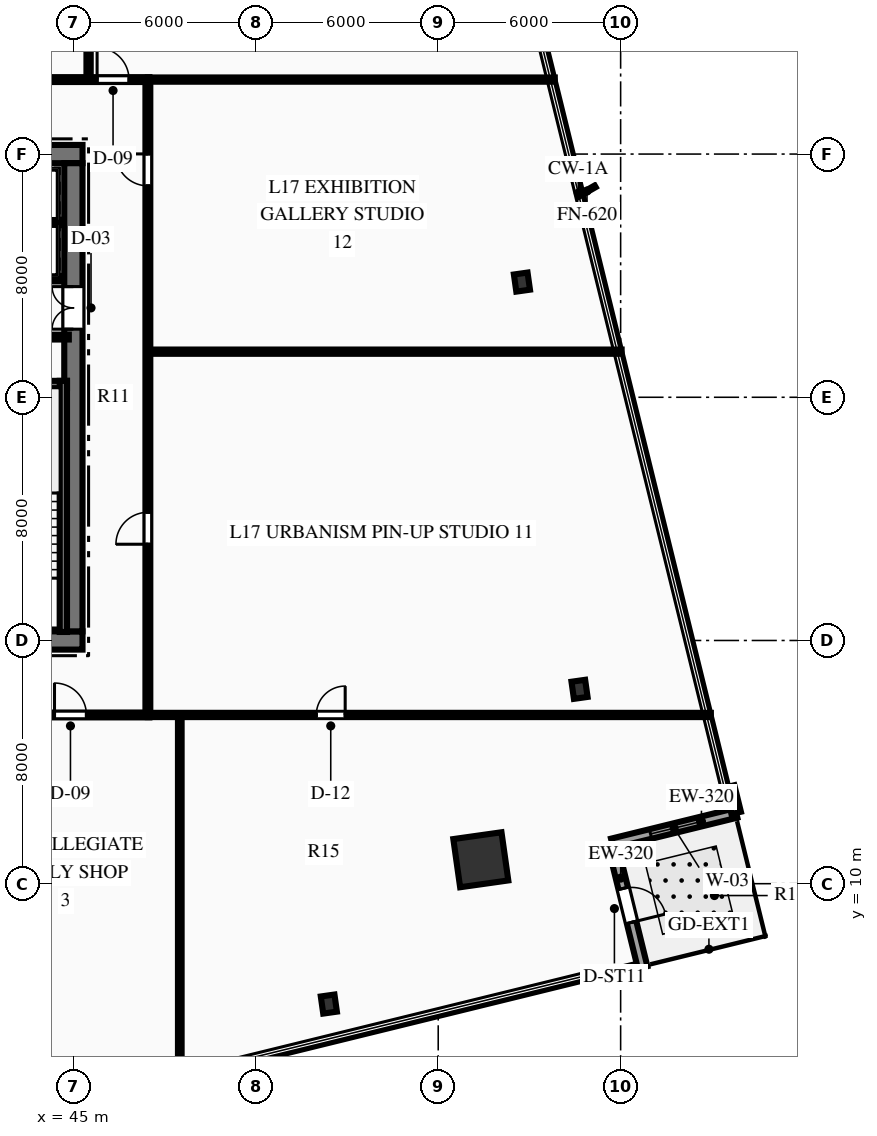
"""IFC4 building model, lengths in metres.
Left out: names, types, materials, properties, quantities, classifications, styles, units other than length and angle.
Written with IfcOpenShell. Run it as: python <this file> out.ifc"""

import sys

from ifc_helpers import new_model, si_unit, direction, frame, frame_2d, origin, origin_2d, place, context, subcontext, project, spatial, rectangle, hollow_rectangle, i_section, extrude, element, fill, save


model = new_model("IFC4")
c1 = context("Model", 3, precision=1e-05, world=origin(), true_north=direction((0.0, 1.0)))
c2 = subcontext(c1, "Body", "Model", "MODEL_VIEW")
j1 = project(units=[si_unit("LENGTHUNIT", "METRE"), si_unit("PLANEANGLEUNIT", "RADIAN")], contexts=[c1])
p1 = place(None, origin())
s1 = spatial("IfcSite", under=j1, at=p1, CompositionType="ELEMENT")
p2 = place(p1, origin())
s2 = spatial("IfcBuilding", under=s1, at=p2, CompositionType="ELEMENT")
p3 = place(p2, frame((0.0, 0.0, 73.95)))
s3 = spatial("IfcBuildingStorey", under=s2, at=p3, CompositionType="ELEMENT", Elevation=73.95)
p4 = place(p3, frame((26.7, 18.0, 0.0), z_axis=(0.0, 0.0, 1.0), x_axis=(1.0, 0.0, 0.0)))
e1 = element("IfcWall", 1, at=p4, inside=s3, PredefinedType="SHEAR", context=c2, shape_type="SweptSolid", body=[
    extrude(rectangle(XDim=18.6, YDim=0.6, at=frame_2d((9.3, 0.0))), origin(), (0.0, 0.0, 1.0), 3.75),
])
p5 = place(p4, frame((7.4, 0.0, 0.0)))
e2 = element("IfcOpeningElement", 2, at=p5, cuts=e1, PredefinedType="OPENING", context=c2, shape_type="SweptSolid", body=[
    extrude(rectangle(XDim=1.1, YDim=2.15, at=frame_2d((0.55, 1.075))), frame((0.0, 0.31, 0.0), z_axis=(0.0, -1.0, 0.0), x_axis=(1.0, 0.0, 0.0)), (0.0, 0.0, 1.0), 0.62),
])
p6 = place(p4, frame((10.1, 0.0, 0.0)))
e3 = element("IfcOpeningElement", 3, at=p6, cuts=e1, PredefinedType="OPENING", context=c2, shape_type="SweptSolid", body=[
    extrude(rectangle(XDim=1.1, YDim=2.15, at=frame_2d((0.55, 1.075))), frame((0.0, 0.31, 0.0), z_axis=(0.0, -1.0, 0.0), x_axis=(1.0, 0.0, 0.0)), (0.0, 0.0, 1.0), 0.62),
])
p7 = place(p3, frame((26.7, 34.0, 0.0), z_axis=(0.0, 0.0, 1.0), x_axis=(1.0, 0.0, 0.0)))
e4 = element("IfcWall", 4, at=p7, inside=s3, PredefinedType="SHEAR", context=c2, shape_type="SweptSolid", body=[
    extrude(rectangle(XDim=18.6, YDim=0.6, at=frame_2d((9.3, 0.0))), origin(), (0.0, 0.0, 1.0), 3.75),
])
p8 = place(p7, frame((1.265, 0.0, 0.0)))
e5 = element("IfcOpeningElement", 5, at=p8, cuts=e4, PredefinedType="OPENING", context=c2, shape_type="SweptSolid", body=[
    extrude(rectangle(XDim=1.1, YDim=2.15, at=frame_2d((0.55, 1.075))), frame((0.0, 0.31, 0.0), z_axis=(0.0, -1.0, 0.0), x_axis=(1.0, 0.0, 0.0)), (0.0, 0.0, 1.0), 0.62),
])
p9 = place(p7, frame((3.515, 0.0, 0.0)))
e6 = element("IfcOpeningElement", 6, at=p9, cuts=e4, PredefinedType="OPENING", context=c2, shape_type="SweptSolid", body=[
    extrude(rectangle(XDim=1.1, YDim=2.15, at=frame_2d((0.55, 1.075))), frame((0.0, 0.31, 0.0), z_axis=(0.0, -1.0, 0.0), x_axis=(1.0, 0.0, 0.0)), (0.0, 0.0, 1.0), 0.62),
])
p10 = place(p7, frame((13.985, 0.0, 0.0)))
e7 = element("IfcOpeningElement", 7, at=p10, cuts=e4, PredefinedType="OPENING", context=c2, shape_type="SweptSolid", body=[
    extrude(rectangle(XDim=1.1, YDim=2.15, at=frame_2d((0.55, 1.075))), frame((0.0, 0.31, 0.0), z_axis=(0.0, -1.0, 0.0), x_axis=(1.0, 0.0, 0.0)), (0.0, 0.0, 1.0), 0.62),
])
p11 = place(p7, frame((16.235, 0.0, 0.0)))
e8 = element("IfcOpeningElement", 8, at=p11, cuts=e4, PredefinedType="OPENING", context=c2, shape_type="SweptSolid", body=[
    extrude(rectangle(XDim=1.1, YDim=2.15, at=frame_2d((0.55, 1.075))), frame((0.0, 0.31, 0.0), z_axis=(0.0, -1.0, 0.0), x_axis=(1.0, 0.0, 0.0)), (0.0, 0.0, 1.0), 0.62),
])
p12 = place(p3, frame((45.0, 18.3, 0.0), z_axis=(0.0, 0.0, 1.0), x_axis=(0.0, 1.0, 0.0)))
e9 = element("IfcWall", 9, at=p12, inside=s3, PredefinedType="SHEAR", context=c2, shape_type="SweptSolid", body=[
    extrude(rectangle(XDim=15.4, YDim=0.6, at=frame_2d((7.7, 0.0))), origin(), (0.0, 0.0, 1.0), 3.75),
])
p13 = place(p12, frame((9.94, 0.0, 0.0)))
e10 = element("IfcOpeningElement", 10, at=p13, cuts=e9, PredefinedType="OPENING", context=c2, shape_type="SweptSolid", body=[
    extrude(rectangle(XDim=1.4, YDim=2.2, at=frame_2d((0.7, 1.1))), frame((0.0, 0.31, 0.0), z_axis=(0.0, -1.0, 0.0), x_axis=(1.0, 0.0, 0.0)), (0.0, 0.0, 1.0), 0.62),
])
p14 = place(p3, frame((40.81, 26.42, 0.0), z_axis=(0.0, 0.0, 1.0), x_axis=(1.0, 0.0, 0.0)))
e11 = element("IfcWall", 11, at=p14, inside=s3, PredefinedType="SHEAR", context=c2, shape_type="SweptSolid", body=[
    extrude(rectangle(XDim=3.98, YDim=0.24, at=frame_2d((1.99, 0.0))), origin(), (0.0, 0.0, 1.0), 3.75),
])
p15 = place(p3, frame((44.67, 18.28, 0.0), z_axis=(0.0, 0.0, 1.0), x_axis=(0.0, 1.0, 0.0)))
e12 = element("IfcWall", 12, at=p15, inside=s3, PredefinedType="SHEAR", context=c2, shape_type="SweptSolid", body=[
    extrude(rectangle(XDim=8.26, YDim=0.24, at=frame_2d((4.13, 0.0))), origin(), (0.0, 0.0, 1.0), 3.75),
])
p16 = place(p3, frame((58.401, 10.787, 0.0), z_axis=(0.0, 0.0, 1.0), x_axis=(0.990146240249, 0.140037219771, 0.0)))
e13 = element("IfcColumn", 13, at=p16, inside=s3, PredefinedType="COLUMN", context=c2, shape_type="SweptSolid", body=[
    extrude(hollow_rectangle(XDim=1.6, YDim=1.6, WallThickness=0.08, at=origin_2d()), origin(), (0.0, 0.0, 1.0), 3.75),
])
for number, where, z_axis, x_axis in (
    (14, (53.403, 6.04, 0.0), (0.0, 0.0, 1.0), (0.99, 0.14, 0.0)),
    (15, (61.648, 16.393, 0.0), (0.0, 0.0, 1.0), (0.99, 0.14, 0.0)),
    (16, (59.753, 29.789, 0.0), (0.0, 0.0, 1.0), (0.99, 0.14, 0.0)),
):
    element("IfcColumn", number, at=place(p3, frame(where, z_axis=z_axis, x_axis=x_axis)), inside=s3, PredefinedType="COLUMN", context=c2, shape_type="SweptSolid", body=[
        extrude(i_section(OverallWidth=0.454, OverallDepth=0.569, WebThickness=0.078, FlangeThickness=0.125, at=origin_2d()), origin(), (0.0, 0.0, 1.0), 3.75),
    ])
p17 = place(p3, frame((63.724, 7.247, 0.0), z_axis=(0.0, 0.0, 1.0), x_axis=(-0.971155160294, -0.238448431815, 0.0)))
e17 = element("IfcWall", 17, at=p17, inside=s3, PredefinedType="STANDARD", context=c2, shape_type="SweptSolid", body=[
    extrude(rectangle(XDim=0.9, YDim=0.32, at=frame_2d((0.45, 0.0))), origin(), (0.0, 0.0, 1.0), 3.44),
])
p18 = place(p3, frame((62.722, 11.325, 0.0), z_axis=(0.0, 0.0, 1.0), x_axis=(0.238553587824, -0.971129335226, 0.0)))
e18 = element("IfcWall", 18, at=p18, inside=s3, PredefinedType="STANDARD", context=c2, shape_type="SweptSolid", body=[
    extrude(rectangle(XDim=4.2, YDim=0.32, at=frame_2d((2.1, 0.0))), origin(), (0.0, 0.0, 1.0), 3.44),
])
p19 = place(p18, frame((1.525, 0.0, 0.0)))
e19 = element("IfcOpeningElement", 19, at=p19, cuts=e18, PredefinedType="OPENING", context=c2, shape_type="SweptSolid", body=[
    extrude(rectangle(XDim=1.15, YDim=2.2, at=frame_2d((0.575, 1.1))), frame((0.0, 0.17, 0.0), z_axis=(0.0, -1.0, 0.0), x_axis=(1.0, 0.0, 0.0)), (0.0, 0.0, 1.0), 0.34),
])
p20 = place(p3, frame((66.801, 12.327, 0.0), z_axis=(0.0, 0.0, 1.0), x_axis=(-0.971129335226, -0.238553587824, 0.0)))
e20 = element("IfcWall", 20, at=p20, inside=s3, PredefinedType="STANDARD", context=c2, shape_type="SweptSolid", body=[
    extrude(rectangle(XDim=4.2, YDim=0.32, at=frame_2d((2.1, 0.0))), origin(), (0.0, 0.0, 1.0), 3.44),
])
p21 = place(p20, frame((1.3, 0.0, 0.85)))
e21 = element("IfcOpeningElement", 21, at=p21, cuts=e20, PredefinedType="OPENING", context=c2, shape_type="SweptSolid", body=[
    extrude(rectangle(XDim=1.6, YDim=2.1, at=frame_2d((0.8, 1.05))), frame((0.0, 0.17, 0.0), z_axis=(0.0, -1.0, 0.0), x_axis=(1.0, 0.0, 0.0)), (0.0, 0.0, 1.0), 0.34),
])
p22 = place(p3, frame((66.586, 13.201, 0.0), z_axis=(0.0, 0.0, 1.0), x_axis=(0.238704255463, -0.971092311999, 0.0)))
e22 = element("IfcWall", 22, at=p22, inside=s3, PredefinedType="STANDARD", context=c2, shape_type="SweptSolid", body=[
    extrude(rectangle(XDim=0.9, YDim=0.32, at=frame_2d((0.45, 0.0))), origin(), (0.0, 0.0, 1.0), 3.44),
])
p23 = place(p3, frame((40.8, 27.98, 0.0), z_axis=(0.0, 0.0, 1.0), x_axis=(1.0, 0.0, 0.0)))
e23 = element("IfcWall", 23, at=p23, inside=s3, PredefinedType="PARTITIONING", context=c2, shape_type="SweptSolid", body=[
    extrude(rectangle(XDim=4.05, YDim=0.16, at=frame_2d((2.025, 0.0))), origin(), (0.0, 0.0, 1.0), 3.44),
])
p24 = place(p23, frame((1.475, 0.0, 0.0)))
e24 = element("IfcOpeningElement", 24, at=p24, cuts=e23, PredefinedType="OPENING", context=c2, shape_type="SweptSolid", body=[
    extrude(rectangle(XDim=0.95, YDim=2.15, at=frame_2d((0.475, 1.075))), frame((0.0, 0.09, 0.0), z_axis=(0.0, -1.0, 0.0), x_axis=(1.0, 0.0, 0.0)), (0.0, 0.0, 1.0), 0.18),
])
p25 = place(p3, frame((40.12, 29.9, 0.0), z_axis=(0.0, 0.0, 1.0), x_axis=(1.0, 0.0, 0.0)))
e25 = element("IfcWall", 25, at=p25, inside=s3, PredefinedType="PARTITIONING", context=c2, shape_type="SweptSolid", body=[
    extrude(rectangle(XDim=4.43, YDim=0.18, at=frame_2d((2.215, 0.0))), origin(), (0.0, 0.0, 1.0), 3.44),
])
p26 = place(p25, frame((0.565, 0.0, 0.0)))
e26 = element("IfcOpeningElement", 26, at=p26, cuts=e25, PredefinedType="OPENING", context=c2, shape_type="SweptSolid", body=[
    extrude(rectangle(XDim=1.1, YDim=2.15, at=frame_2d((0.55, 1.075))), frame((0.0, 0.1, 0.0), z_axis=(0.0, -1.0, 0.0), x_axis=(1.0, 0.0, 0.0)), (0.0, 0.0, 1.0), 0.2),
])
p27 = place(p25, frame((2.815, 0.0, 0.0)))
e27 = element("IfcOpeningElement", 27, at=p27, cuts=e25, PredefinedType="OPENING", context=c2, shape_type="SweptSolid", body=[
    extrude(rectangle(XDim=1.1, YDim=2.15, at=frame_2d((0.55, 1.075))), frame((0.0, 0.1, 0.0), z_axis=(0.0, -1.0, 0.0), x_axis=(1.0, 0.0, 0.0)), (0.0, 0.0, 1.0), 0.2),
])
p28 = place(p3, frame((40.12, 31.75, 0.0), z_axis=(0.0, 0.0, 1.0), x_axis=(1.0, 0.0, 0.0)))
e28 = element("IfcWall", 28, at=p28, inside=s3, PredefinedType="PARTITIONING", context=c2, shape_type="SweptSolid", body=[
    extrude(rectangle(XDim=4.43, YDim=0.18, at=frame_2d((2.215, 0.0))), origin(), (0.0, 0.0, 1.0), 3.44),
])
p29 = place(p3, frame((24.5, 15.55, 0.0), z_axis=(0.0, 0.0, 1.0), x_axis=(1.0, 0.0, 0.0)))
e29 = element("IfcWall", 29, at=p29, inside=s3, PredefinedType="PARTITIONING", context=c2, shape_type="SweptSolid", body=[
    extrude(rectangle(XDim=23.0, YDim=0.16, at=frame_2d((11.5, 0.0))), origin(), (0.0, 0.0, 1.0), 3.44),
])
p30 = place(p29, frame((0.425, 0.0, 0.0)))
e30 = element("IfcOpeningElement", 30, at=p30, cuts=e29, PredefinedType="OPENING", context=c2, shape_type="SweptSolid", body=[
    extrude(rectangle(XDim=0.9, YDim=2.15, at=frame_2d((0.45, 1.075))), frame((0.0, 0.09, 0.0), z_axis=(0.0, -1.0, 0.0), x_axis=(1.0, 0.0, 0.0)), (0.0, 0.0, 1.0), 0.18),
])
p31 = place(p29, frame((5.655, 0.0, 0.0)))
e31 = element("IfcOpeningElement", 31, at=p31, cuts=e29, PredefinedType="OPENING", context=c2, shape_type="SweptSolid", body=[
    extrude(rectangle(XDim=1.05, YDim=2.15, at=frame_2d((0.525, 1.075))), frame((0.0, 0.09, 0.0), z_axis=(0.0, -1.0, 0.0), x_axis=(1.0, 0.0, 0.0)), (0.0, 0.0, 1.0), 0.18),
])
p32 = place(p29, frame((19.879, 0.0, 0.0)))
e32 = element("IfcOpeningElement", 32, at=p32, cuts=e29, PredefinedType="OPENING", context=c2, shape_type="SweptSolid", body=[
    extrude(rectangle(XDim=1.05, YDim=2.15, at=frame_2d((0.525, 1.075))), frame((0.0, 0.09, 0.0), z_axis=(0.0, -1.0, 0.0), x_axis=(1.0, 0.0, 0.0)), (0.0, 0.0, 1.0), 0.18),
])
p33 = place(p3, frame((24.5, 36.45, 0.0), z_axis=(0.0, 0.0, 1.0), x_axis=(1.0, 0.0, 0.0)))
e33 = element("IfcWall", 33, at=p33, inside=s3, PredefinedType="PARTITIONING", context=c2, shape_type="SweptSolid", body=[
    extrude(rectangle(XDim=23.0, YDim=0.16, at=frame_2d((11.5, 0.0))), origin(), (0.0, 0.0, 1.0), 3.44),
])
p34 = place(p33, frame((1.25, 0.0, 0.0)))
e34 = element("IfcOpeningElement", 34, at=p34, cuts=e33, PredefinedType="OPENING", context=c2, shape_type="SweptSolid", body=[
    extrude(rectangle(XDim=0.9, YDim=2.15, at=frame_2d((0.45, 1.075))), frame((0.0, 0.09, 0.0), z_axis=(0.0, -1.0, 0.0), x_axis=(1.0, 0.0, 0.0)), (0.0, 0.0, 1.0), 0.18),
])
p35 = place(p33, frame((3.55, 0.0, 0.0)))
e35 = element("IfcOpeningElement", 35, at=p35, cuts=e33, PredefinedType="OPENING", context=c2, shape_type="SweptSolid", body=[
    extrude(rectangle(XDim=0.9, YDim=2.15, at=frame_2d((0.45, 1.075))), frame((0.0, 0.09, 0.0), z_axis=(0.0, -1.0, 0.0), x_axis=(1.0, 0.0, 0.0)), (0.0, 0.0, 1.0), 0.18),
])
p36 = place(p33, frame((5.8, 0.0, 0.0)))
e36 = element("IfcOpeningElement", 36, at=p36, cuts=e33, PredefinedType="OPENING", context=c2, shape_type="SweptSolid", body=[
    extrude(rectangle(XDim=1.0, YDim=2.15, at=frame_2d((0.5, 1.075))), frame((0.0, 0.09, 0.0), z_axis=(0.0, -1.0, 0.0), x_axis=(1.0, 0.0, 0.0)), (0.0, 0.0, 1.0), 0.18),
])
p37 = place(p33, frame((9.465, 0.0, 0.0)))
e37 = element("IfcOpeningElement", 37, at=p37, cuts=e33, PredefinedType="OPENING", context=c2, shape_type="SweptSolid", body=[
    extrude(rectangle(XDim=1.05, YDim=2.15, at=frame_2d((0.525, 1.075))), frame((0.0, 0.09, 0.0), z_axis=(0.0, -1.0, 0.0), x_axis=(1.0, 0.0, 0.0)), (0.0, 0.0, 1.0), 0.18),
])
p38 = place(p33, frame((16.755, 0.0, 0.0)))
e38 = element("IfcOpeningElement", 38, at=p38, cuts=e33, PredefinedType="OPENING", context=c2, shape_type="SweptSolid", body=[
    extrude(rectangle(XDim=1.05, YDim=2.15, at=frame_2d((0.525, 1.075))), frame((0.0, 0.09, 0.0), z_axis=(0.0, -1.0, 0.0), x_axis=(1.0, 0.0, 0.0)), (0.0, 0.0, 1.0), 0.18),
])
p39 = place(p33, frame((21.28, 0.0, 0.0)))
e39 = element("IfcOpeningElement", 39, at=p39, cuts=e33, PredefinedType="OPENING", context=c2, shape_type="SweptSolid", body=[
    extrude(rectangle(XDim=1.05, YDim=2.15, at=frame_2d((0.525, 1.075))), frame((0.0, 0.09, 0.0), z_axis=(0.0, -1.0, 0.0), x_axis=(1.0, 0.0, 0.0)), (0.0, 0.0, 1.0), 0.18),
])
p40 = place(p3, frame((47.45, 15.55, 0.0), z_axis=(0.0, 0.0, 1.0), x_axis=(0.0, 1.0, 0.0)))
e40 = element("IfcWall", 40, at=p40, inside=s3, PredefinedType="PARTITIONING", context=c2, shape_type="SweptSolid", body=[
    extrude(rectangle(XDim=20.9, YDim=0.16, at=frame_2d((10.45, 0.0))), origin(), (0.0, 0.0, 1.0), 3.44),
])
p41 = place(p40, frame((5.616, 0.0, 0.0)))
e41 = element("IfcOpeningElement", 41, at=p41, cuts=e40, PredefinedType="OPENING", context=c2, shape_type="SweptSolid", body=[
    extrude(rectangle(XDim=1.05, YDim=2.15, at=frame_2d((0.525, 1.075))), frame((0.0, 0.09, 0.0), z_axis=(0.0, -1.0, 0.0), x_axis=(1.0, 0.0, 0.0)), (0.0, 0.0, 1.0), 0.18),
])
p42 = place(p40, frame((17.405, 0.0, 0.0)))
e42 = element("IfcOpeningElement", 42, at=p42, cuts=e40, PredefinedType="OPENING", context=c2, shape_type="SweptSolid", body=[
    extrude(rectangle(XDim=1.05, YDim=2.15, at=frame_2d((0.525, 1.075))), frame((0.0, 0.09, 0.0), z_axis=(0.0, -1.0, 0.0), x_axis=(1.0, 0.0, 0.0)), (0.0, 0.0, 1.0), 0.18),
])
p43 = place(p3, frame((47.45, 15.55, 0.0), z_axis=(0.0, 0.0, 1.0), x_axis=(1.0, 0.0, 0.0)))
e43 = element("IfcWall", 43, at=p43, inside=s3, PredefinedType="PARTITIONING", context=c2, shape_type="SweptSolid", body=[
    extrude(rectangle(XDim=18.518, YDim=0.14, at=frame_2d((9.259, 0.0))), origin(), (0.0, 0.0, 1.0), 3.44),
])
p44 = place(p43, frame((5.54, 0.0, 0.0)))
e44 = element("IfcOpeningElement", 44, at=p44, cuts=e43, PredefinedType="OPENING", context=c2, shape_type="SweptSolid", body=[
    extrude(rectangle(XDim=0.95, YDim=2.15, at=frame_2d((0.475, 1.075))), frame((0.0, 0.08, 0.0), z_axis=(0.0, -1.0, 0.0), x_axis=(1.0, 0.0, 0.0)), (0.0, 0.0, 1.0), 0.16),
])
p45 = place(p3, frame((47.45, 36.45, 0.0), z_axis=(0.0, 0.0, 1.0), x_axis=(1.0, 0.0, 0.0)))
e45 = element("IfcWall", 45, at=p45, inside=s3, PredefinedType="PARTITIONING", context=c2, shape_type="SweptSolid", body=[
    extrude(rectangle(XDim=13.384, YDim=0.14, at=frame_2d((6.692, 0.0))), origin(), (0.0, 0.0, 1.0), 3.44),
])
p46 = place(p3, frame((48.5, 3.549, 0.0), z_axis=(0.0, 0.0, 1.0), x_axis=(0.0, 1.0, 0.0)))
e46 = element("IfcWall", 46, at=p46, inside=s3, PredefinedType="PARTITIONING", context=c2, shape_type="SweptSolid", body=[
    extrude(rectangle(XDim=12.001, YDim=0.12, at=frame_2d((6.001, 0.0))), origin(), (0.0, 0.0, 1.0), 3.44),
])
p47 = place(p3, frame((45.5, 36.45, 0.0), z_axis=(0.0, 0.0, 1.0), x_axis=(0.0, 1.0, 0.0)))
e47 = element("IfcWall", 47, at=p47, inside=s3, PredefinedType="PARTITIONING", context=c2, shape_type="SweptSolid", body=[
    extrude(rectangle(XDim=18.255, YDim=0.14, at=frame_2d((9.127, 0.0))), origin(), (0.0, 0.0, 1.0), 2.972),
])
p48 = place(p3, frame((47.45, 27.5, 0.0), z_axis=(0.0, 0.0, 1.0), x_axis=(1.0, 0.0, 0.0)))
e48 = element("IfcWall", 48, at=p48, inside=s3, PredefinedType="PARTITIONING", context=c2, shape_type="SweptSolid", body=[
    extrude(rectangle(XDim=15.583, YDim=0.14, at=frame_2d((7.791, 0.0))), origin(), (0.0, 0.0, 1.0), 3.44),
])
p49 = place(p19, origin())
e49 = element("IfcDoor", 49, at=p49, inside=s3, OperationType="SINGLE_SWING_RIGHT", PredefinedType="DOOR", context=c2, shape_type="SweptSolid", body=[
    extrude(rectangle(XDim=1.15, YDim=2.2, at=frame_2d((0.575, 1.1))), frame((0.0, 0.025, 0.0), z_axis=(0.0, -1.0, 0.0), x_axis=(1.0, 0.0, 0.0)), (0.0, 0.0, 1.0), 0.05),
])
fill(e19, e49)
p50 = place(p21, origin())
e50 = element("IfcWindow", 50, at=p50, inside=s3, PartitioningType="SINGLE_PANEL", PredefinedType="WINDOW", context=c2, shape_type="SweptSolid", body=[
    extrude(rectangle(XDim=1.6, YDim=2.1, at=frame_2d((0.8, 1.05))), frame((0.0, 0.03, 0.0), z_axis=(0.0, -1.0, 0.0), x_axis=(1.0, 0.0, 0.0)), (0.0, 0.0, 1.0), 0.06),
])
fill(e21, e50)
p51 = place(p13, origin())
e51 = element("IfcDoor", 51, at=p51, inside=s3, OperationType="DOUBLE_DOOR_SINGLE_SWING", PredefinedType="DOOR", context=c2, shape_type="SweptSolid", body=[
    extrude(rectangle(XDim=1.4, YDim=2.2, at=frame_2d((0.7, 1.1))), frame((0.0, 0.025, 0.0), z_axis=(0.0, -1.0, 0.0), x_axis=(1.0, 0.0, 0.0)), (0.0, 0.0, 1.0), 0.05),
])
fill(e10, e51)
p52 = place(p32, origin())
e52 = element("IfcDoor", 52, at=p52, inside=s3, OperationType="SINGLE_SWING_LEFT", PredefinedType="DOOR", context=c2, shape_type="SweptSolid", body=[
    extrude(rectangle(XDim=1.05, YDim=2.15, at=frame_2d((0.525, 1.075))), frame((0.0, 0.025, 0.0), z_axis=(0.0, -1.0, 0.0), x_axis=(1.0, 0.0, 0.0)), (0.0, 0.0, 1.0), 0.05),
])
fill(e32, e52)
p53 = place(p44, origin())
e53 = element("IfcDoor", 53, at=p53, inside=s3, OperationType="SINGLE_SWING_RIGHT", PredefinedType="DOOR", context=c2, shape_type="SweptSolid", body=[
    extrude(rectangle(XDim=0.95, YDim=2.15, at=frame_2d((0.475, 1.075))), frame((0.0, 0.025, 0.0), z_axis=(0.0, -1.0, 0.0), x_axis=(1.0, 0.0, 0.0)), (0.0, 0.0, 1.0), 0.05),
])
fill(e44, e53)
p54 = place(p39, origin())
e54 = element("IfcDoor", 54, at=p54, inside=s3, OperationType="SINGLE_SWING_LEFT", PredefinedType="DOOR", context=c2, shape_type="SweptSolid", body=[
    extrude(rectangle(XDim=1.05, YDim=2.15, at=frame_2d((0.525, 1.075))), frame((0.0, 0.025, 0.0), z_axis=(0.0, -1.0, 0.0), x_axis=(1.0, 0.0, 0.0)), (0.0, 0.0, 1.0), 0.05),
])
fill(e39, e54)
p55 = place(p41, origin())
e55 = element("IfcDoor", 55, at=p55, inside=s3, OperationType="SINGLE_SWING_LEFT", PredefinedType="DOOR", context=c2, shape_type="SweptSolid", body=[
    extrude(rectangle(XDim=1.05, YDim=2.15, at=frame_2d((0.525, 1.075))), frame((0.0, 0.025, 0.0), z_axis=(0.0, -1.0, 0.0), x_axis=(1.0, 0.0, 0.0)), (0.0, 0.0, 1.0), 0.05),
])
fill(e41, e55)
p56 = place(p42, origin())
e56 = element("IfcDoor", 56, at=p56, inside=s3, OperationType="SINGLE_SWING_RIGHT", PredefinedType="DOOR", context=c2, shape_type="SweptSolid", body=[
    extrude(rectangle(XDim=1.05, YDim=2.15, at=frame_2d((0.525, 1.075))), frame((0.0, 0.025, 0.0), z_axis=(0.0, -1.0, 0.0), x_axis=(1.0, 0.0, 0.0)), (0.0, 0.0, 1.0), 0.05),
])
fill(e42, e56)
save(model, sys.argv[1])
